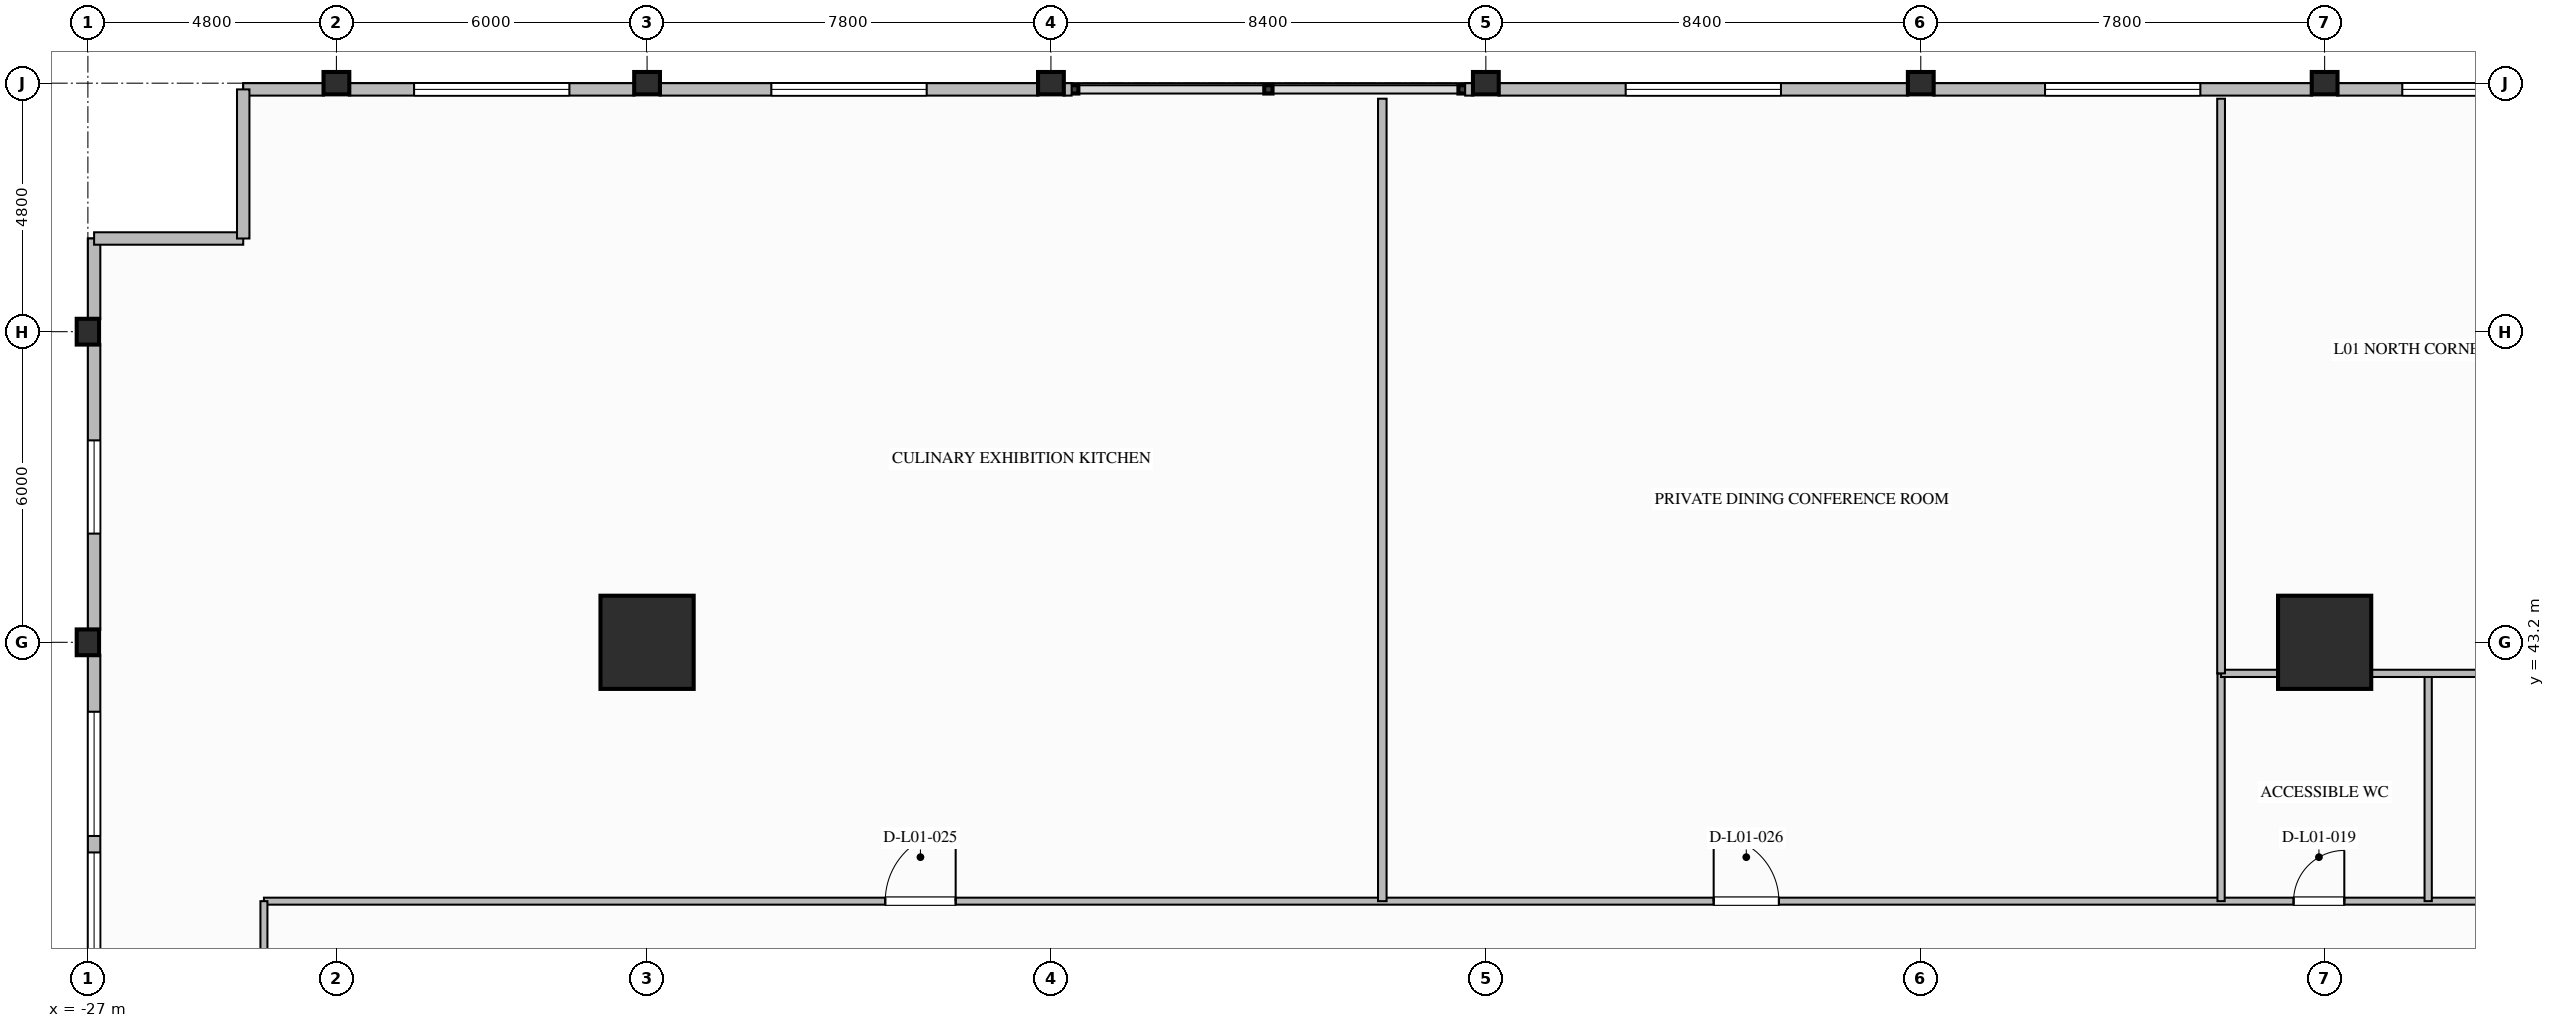
"""IFC4 building model, lengths in metres.
Left out: names, types, materials, properties, quantities, classifications, styles, units other than length and angle.
Written with IfcOpenShell. Run it as: python <this file> out.ifc"""

import sys

from ifc_helpers import new_model, si_unit, direction, frame, frame_2d, origin, origin_2d, place, context, subcontext, project, spatial, rectangle, i_section, extrude, element, fill, save


model = new_model("IFC4")
c1 = context("Model", 3, precision=1e-05, world=origin(), true_north=direction((0.0, 1.0)))
c2 = subcontext(c1, "Body", "Model", "MODEL_VIEW")
j1 = project(units=[si_unit("LENGTHUNIT", "METRE"), si_unit("PLANEANGLEUNIT", "RADIAN")], contexts=[c1])
p1 = place(None, origin())
s1 = spatial("IfcSite", under=j1, at=p1, CompositionType="ELEMENT")
p2 = place(p1, origin())
s2 = spatial("IfcBuilding", under=s1, at=p2, CompositionType="ELEMENT")
p3 = place(p2, frame((0.0, 0.0, 5.6)))
s3 = spatial("IfcBuildingStorey", under=s2, at=p3, CompositionType="ELEMENT", Elevation=5.6)
for number, where, z_axis, x_axis in (
    (1, (-16.2, 43.2, 0.0), (0.0, 0.0, 1.0), (1.0, 0.0, 0.0)),
    (2, (16.2, 43.2, 0.0), (0.0, 0.0, 1.0), (1.0, 0.0, 0.0)),
):
    element("IfcColumn", number, at=place(p3, frame(where, z_axis=z_axis, x_axis=x_axis)), inside=s3, PredefinedType="COLUMN", context=c2, shape_type="SweptSolid", body=[
        extrude(rectangle(XDim=1.8, YDim=1.8, at=origin_2d()), origin(), (0.0, 0.0, 1.0), 5.2),
    ])
for number, where, z_axis, x_axis in (
    (3, (-27.0, 43.2, 0.0), (0.0, 0.0, 1.0), (1.0, 0.0, 0.0)),
    (4, (-27.0, 49.2, 0.0), (0.0, 0.0, 1.0), (1.0, 0.0, 0.0)),
    (5, (-22.2, 54.0, 0.0), (0.0, 0.0, 1.0), (0.0, 1.0, 0.0)),
    (6, (-16.2, 54.0, 0.0), (0.0, 0.0, 1.0), (0.0, 1.0, 0.0)),
    (7, (-8.4, 54.0, 0.0), (0.0, 0.0, 1.0), (0.0, 1.0, 0.0)),
    (8, (0.0, 54.0, 0.0), (0.0, 0.0, 1.0), (0.0, 1.0, 0.0)),
    (9, (8.4, 54.0, 0.0), (0.0, 0.0, 1.0), (0.0, 1.0, 0.0)),
    (10, (16.2, 54.0, 0.0), (0.0, 0.0, 1.0), (0.0, 1.0, 0.0)),
):
    element("IfcColumn", number, at=place(p3, frame(where, z_axis=z_axis, x_axis=x_axis)), inside=s3, PredefinedType="COLUMN", context=c2, shape_type="SweptSolid", body=[
        extrude(i_section(OverallWidth=0.432, OverallDepth=0.498, WebThickness=0.056, FlangeThickness=0.089, FilletRadius=0.03, at=origin_2d()), origin(), (0.0, 0.0, 1.0), 5.2),
    ])
p4 = place(p3, frame((-26.88, 35.641, 0.0), z_axis=(0.0, 0.0, 1.0), x_axis=(0.0, 1.0, 0.0)))
e11 = element("IfcWall", 11, at=p4, inside=s3, PredefinedType="STANDARD", context=c2, shape_type="SweptSolid", body=[
    extrude(rectangle(XDim=7.318, YDim=0.24, at=frame_2d((3.659, 0.0))), origin(), (0.0, 0.0, 1.0), 4.154),
])
p5 = place(p4, frame((1.1, 0.0, 0.7)))
e12 = element("IfcOpeningElement", 12, at=p5, cuts=e11, PredefinedType="OPENING", context=c2, shape_type="SweptSolid", body=[
    extrude(rectangle(XDim=2.4, YDim=2.4, at=frame_2d((1.2, 1.2))), frame((0.0, 0.13, 0.0), z_axis=(0.0, -1.0, 0.0), x_axis=(1.0, 0.0, 0.0)), (0.0, 0.0, 1.0), 0.26),
])
p6 = place(p4, frame((3.818, 0.0, 0.7)))
e13 = element("IfcOpeningElement", 13, at=p6, cuts=e11, PredefinedType="OPENING", context=c2, shape_type="SweptSolid", body=[
    extrude(rectangle(XDim=2.4, YDim=2.4, at=frame_2d((1.2, 1.2))), frame((0.0, 0.13, 0.0), z_axis=(0.0, -1.0, 0.0), x_axis=(1.0, 0.0, 0.0)), (0.0, 0.0, 1.0), 0.26),
])
p7 = place(p3, frame((-26.88, 43.441, 0.0), z_axis=(0.0, 0.0, 1.0), x_axis=(0.0, 1.0, 0.0)))
e14 = element("IfcWall", 14, at=p7, inside=s3, PredefinedType="STANDARD", context=c2, shape_type="SweptSolid", body=[
    extrude(rectangle(XDim=5.518, YDim=0.24, at=frame_2d((2.759, 0.0))), origin(), (0.0, 0.0, 1.0), 4.154),
])
p8 = place(p7, frame((1.859, 0.0, 0.7)))
e15 = element("IfcOpeningElement", 15, at=p8, cuts=e14, PredefinedType="OPENING", context=c2, shape_type="SweptSolid", body=[
    extrude(rectangle(XDim=1.8, YDim=2.2, at=frame_2d((0.9, 1.1))), frame((0.0, 0.13, 0.0), z_axis=(0.0, -1.0, 0.0), x_axis=(1.0, 0.0, 0.0)), (0.0, 0.0, 1.0), 0.26),
])
for number, where, z_axis, x_axis in (
    (16, (-26.88, 49.441, 0.0), (0.0, 0.0, 1.0), (0.0, 1.0, 0.0)),
    (17, (-24.0, 53.88, 0.0), (0.0, 0.0, 1.0), (1.0, 0.0, 0.0)),
):
    element("IfcWall", number, at=place(p3, frame(where, z_axis=z_axis, x_axis=x_axis)), inside=s3, PredefinedType="STANDARD", context=c2, shape_type="SweptSolid", body=[
        extrude(rectangle(XDim=1.559, YDim=0.24, at=frame_2d((0.78, 0.0))), origin(), (0.0, 0.0, 1.0), 4.85),
    ])
p9 = place(p3, frame((-21.959, 53.88, 0.0), z_axis=(0.0, 0.0, 1.0), x_axis=(1.0, 0.0, 0.0)))
e18 = element("IfcWall", 18, at=p9, inside=s3, PredefinedType="STANDARD", context=c2, shape_type="SweptSolid", body=[
    extrude(rectangle(XDim=5.518, YDim=0.24, at=frame_2d((2.759, 0.0))), origin(), (0.0, 0.0, 1.0), 4.154),
])
p10 = place(p9, frame((1.259, 0.0, 0.65)))
e19 = element("IfcOpeningElement", 19, at=p10, cuts=e18, PredefinedType="OPENING", context=c2, shape_type="SweptSolid", body=[
    extrude(rectangle(XDim=3.0, YDim=2.2, at=frame_2d((1.5, 1.1))), frame((0.0, 0.13, 0.0), z_axis=(0.0, -1.0, 0.0), x_axis=(1.0, 0.0, 0.0)), (0.0, 0.0, 1.0), 0.26),
])
p11 = place(p3, frame((-15.959, 53.88, 0.0), z_axis=(0.0, 0.0, 1.0), x_axis=(1.0, 0.0, 0.0)))
e20 = element("IfcWall", 20, at=p11, inside=s3, PredefinedType="STANDARD", context=c2, shape_type="SweptSolid", body=[
    extrude(rectangle(XDim=7.318, YDim=0.24, at=frame_2d((3.659, 0.0))), origin(), (0.0, 0.0, 1.0), 4.154),
])
p12 = place(p11, frame((2.159, 0.0, 0.65)))
e21 = element("IfcOpeningElement", 21, at=p12, cuts=e20, PredefinedType="OPENING", context=c2, shape_type="SweptSolid", body=[
    extrude(rectangle(XDim=3.0, YDim=2.2, at=frame_2d((1.5, 1.1))), frame((0.0, 0.13, 0.0), z_axis=(0.0, -1.0, 0.0), x_axis=(1.0, 0.0, 0.0)), (0.0, 0.0, 1.0), 0.26),
])
p13 = place(p3, frame((-8.159, 53.88, 0.0), z_axis=(0.0, 0.0, 1.0), x_axis=(1.0, 0.0, 0.0)))
e22 = element("IfcWall", 22, at=p13, inside=s3, PredefinedType="STANDARD", context=c2, shape_type="SweptSolid", body=[
    extrude(rectangle(XDim=0.159, YDim=0.24, at=frame_2d((0.08, 0.0))), origin(), (0.0, 0.0, 1.0), 4.85),
])
p14 = place(p3, frame((-0.4, 53.88, 0.0), z_axis=(0.0, 0.0, 1.0), x_axis=(1.0, 0.0, 0.0)))
e23 = element("IfcWall", 23, at=p14, inside=s3, PredefinedType="STANDARD", context=c2, shape_type="SweptSolid", body=[
    extrude(rectangle(XDim=0.159, YDim=0.24, at=frame_2d((0.08, 0.0))), origin(), (0.0, 0.0, 1.0), 4.85),
])
p15 = place(p3, frame((0.241, 53.88, 0.0), z_axis=(0.0, 0.0, 1.0), x_axis=(1.0, 0.0, 0.0)))
e24 = element("IfcWall", 24, at=p15, inside=s3, PredefinedType="STANDARD", context=c2, shape_type="SweptSolid", body=[
    extrude(rectangle(XDim=7.918, YDim=0.24, at=frame_2d((3.959, 0.0))), origin(), (0.0, 0.0, 1.0), 4.154),
])
p16 = place(p15, frame((2.459, 0.0, 0.65)))
e25 = element("IfcOpeningElement", 25, at=p16, cuts=e24, PredefinedType="OPENING", context=c2, shape_type="SweptSolid", body=[
    extrude(rectangle(XDim=3.0, YDim=2.2, at=frame_2d((1.5, 1.1))), frame((0.0, 0.13, 0.0), z_axis=(0.0, -1.0, 0.0), x_axis=(1.0, 0.0, 0.0)), (0.0, 0.0, 1.0), 0.26),
])
p17 = place(p3, frame((8.641, 53.88, 0.0), z_axis=(0.0, 0.0, 1.0), x_axis=(1.0, 0.0, 0.0)))
e26 = element("IfcWall", 26, at=p17, inside=s3, PredefinedType="STANDARD", context=c2, shape_type="SweptSolid", body=[
    extrude(rectangle(XDim=7.318, YDim=0.24, at=frame_2d((3.659, 0.0))), origin(), (0.0, 0.0, 1.0), 4.154),
])
p18 = place(p17, frame((2.159, 0.0, 0.65)))
e27 = element("IfcOpeningElement", 27, at=p18, cuts=e26, PredefinedType="OPENING", context=c2, shape_type="SweptSolid", body=[
    extrude(rectangle(XDim=3.0, YDim=2.2, at=frame_2d((1.5, 1.1))), frame((0.0, 0.13, 0.0), z_axis=(0.0, -1.0, 0.0), x_axis=(1.0, 0.0, 0.0)), (0.0, 0.0, 1.0), 0.26),
])
p19 = place(p3, frame((16.441, 53.88, 0.0), z_axis=(0.0, 0.0, 1.0), x_axis=(1.0, 0.0, 0.0)))
e28 = element("IfcWall", 28, at=p19, inside=s3, PredefinedType="STANDARD", context=c2, shape_type="SweptSolid", body=[
    extrude(rectangle(XDim=5.518, YDim=0.24, at=frame_2d((2.759, 0.0))), origin(), (0.0, 0.0, 1.0), 4.154),
])
p20 = place(p19, frame((1.259, 0.0, 0.65)))
e29 = element("IfcOpeningElement", 29, at=p20, cuts=e28, PredefinedType="OPENING", context=c2, shape_type="SweptSolid", body=[
    extrude(rectangle(XDim=3.0, YDim=2.2, at=frame_2d((1.5, 1.1))), frame((0.0, 0.13, 0.0), z_axis=(0.0, -1.0, 0.0), x_axis=(1.0, 0.0, 0.0)), (0.0, 0.0, 1.0), 0.26),
])
for number, where, z_axis, x_axis in (
    (30, (-26.88, 51.0, 0.0), (0.0, 0.0, 1.0), (1.0, 0.0, 0.0)),
    (31, (-24.0, 51.0, 0.0), (0.0, 0.0, 1.0), (0.0, 1.0, 0.0)),
):
    element("IfcWall", number, at=place(p3, frame(where, z_axis=z_axis, x_axis=x_axis)), inside=s3, PredefinedType="STANDARD", context=c2, shape_type="SweptSolid", body=[
        extrude(rectangle(XDim=2.88, YDim=0.24, at=frame_2d((1.44, 0.0))), origin(), (0.0, 0.0, 1.0), 4.85),
    ])
p21 = place(p3, frame((-23.6, 38.2, 0.0), z_axis=(0.0, 0.0, 1.0), x_axis=(1.0, 0.0, 0.0)))
e32 = element("IfcWall", 32, at=p21, inside=s3, PredefinedType="PARTITIONING", context=c2, shape_type="SweptSolid", body=[
    extrude(rectangle(XDim=47.3, YDim=0.135, at=frame_2d((23.65, 0.0))), origin(), (0.0, 0.0, 1.0), 4.85),
])
p22 = place(p21, frame((39.2, 0.0, 0.0)))
e33 = element("IfcOpeningElement", 33, at=p22, cuts=e32, PredefinedType="OPENING", context=c2, shape_type="SweptSolid", body=[
    extrude(rectangle(XDim=0.98, YDim=2.1, at=frame_2d((0.49, 1.05))), frame((0.0, 0.077, 0.0), z_axis=(0.0, -1.0, 0.0), x_axis=(1.0, 0.0, 0.0)), (0.0, 0.0, 1.0), 0.155),
])
p23 = place(p21, frame((44.0, 0.0, 0.0)))
e34 = element("IfcOpeningElement", 34, at=p23, cuts=e32, PredefinedType="OPENING", context=c2, shape_type="SweptSolid", body=[
    extrude(rectangle(XDim=0.92, YDim=2.1, at=frame_2d((0.46, 1.05))), frame((0.0, 0.077, 0.0), z_axis=(0.0, -1.0, 0.0), x_axis=(1.0, 0.0, 0.0)), (0.0, 0.0, 1.0), 0.155),
])
p24 = place(p21, frame((12.0, 0.0, 0.0)))
e35 = element("IfcOpeningElement", 35, at=p24, cuts=e32, PredefinedType="OPENING", context=c2, shape_type="SweptSolid", body=[
    extrude(rectangle(XDim=1.36, YDim=2.2, at=frame_2d((0.68, 1.1))), frame((0.0, 0.077, 0.0), z_axis=(0.0, -1.0, 0.0), x_axis=(1.0, 0.0, 0.0)), (0.0, 0.0, 1.0), 0.155),
])
p25 = place(p21, frame((28.0, 0.0, 0.0)))
e36 = element("IfcOpeningElement", 36, at=p25, cuts=e32, PredefinedType="OPENING", context=c2, shape_type="SweptSolid", body=[
    extrude(rectangle(XDim=1.26, YDim=2.2, at=frame_2d((0.63, 1.1))), frame((0.0, 0.077, 0.0), z_axis=(0.0, -1.0, 0.0), x_axis=(1.0, 0.0, 0.0)), (0.0, 0.0, 1.0), 0.155),
])
p26 = place(p3, frame((-23.6, 0.3, 0.0), z_axis=(0.0, 0.0, 1.0), x_axis=(0.0, 1.0, 0.0)))
e37 = element("IfcWall", 37, at=p26, inside=s3, PredefinedType="PARTITIONING", context=c2, shape_type="SweptSolid", body=[
    extrude(rectangle(XDim=37.9, YDim=0.135, at=frame_2d((18.95, 0.0))), origin(), (0.0, 0.0, 1.0), 4.85),
])
p27 = place(p26, frame((9.0, 0.0, 0.0)))
e38 = element("IfcOpeningElement", 38, at=p27, cuts=e37, PredefinedType="OPENING", context=c2, shape_type="SweptSolid", body=[
    extrude(rectangle(XDim=1.08, YDim=2.04, at=frame_2d((0.54, 1.02))), frame((0.0, 0.077, 0.0), z_axis=(0.0, -1.0, 0.0), x_axis=(1.0, 0.0, 0.0)), (0.0, 0.0, 1.0), 0.155),
])
for number, where, z_axis, x_axis in (
    (39, (14.2, 38.2, 0.0), (0.0, 0.0, 1.0), (0.0, 1.0, 0.0)),
    (40, (18.2, 38.2, 0.0), (0.0, 0.0, 1.0), (0.0, 1.0, 0.0)),
):
    element("IfcWall", number, at=place(p3, frame(where, z_axis=z_axis, x_axis=x_axis)), inside=s3, PredefinedType="PLUMBINGWALL", context=c2, shape_type="SweptSolid", body=[
        extrude(rectangle(XDim=4.4, YDim=0.14, at=frame_2d((2.2, 0.0))), origin(), (0.0, 0.0, 1.0), 4.85),
    ])
p28 = place(p3, frame((14.2, 42.6, 0.0), z_axis=(0.0, 0.0, 1.0), x_axis=(1.0, 0.0, 0.0)))
e41 = element("IfcWall", 41, at=p28, inside=s3, PredefinedType="PLUMBINGWALL", context=c2, shape_type="SweptSolid", body=[
    extrude(rectangle(XDim=9.5, YDim=0.14, at=frame_2d((4.75, 0.0))), origin(), (0.0, 0.0, 1.0), 4.85),
])
p29 = place(p3, frame((14.2, 42.6, 0.0), z_axis=(0.0, 0.0, 1.0), x_axis=(0.0, 1.0, 0.0)))
e42 = element("IfcWall", 42, at=p29, inside=s3, PredefinedType="PARTITIONING", context=c2, shape_type="SweptSolid", body=[
    extrude(rectangle(XDim=11.1, YDim=0.15, at=frame_2d((5.55, 0.0))), origin(), (0.0, 0.0, 1.0), 4.85),
])
p30 = place(p3, frame((-2.0, 38.2, 0.0), z_axis=(0.0, 0.0, 1.0), x_axis=(0.0, 1.0, 0.0)))
e43 = element("IfcWall", 43, at=p30, inside=s3, PredefinedType="PARTITIONING", context=c2, shape_type="SweptSolid", body=[
    extrude(rectangle(XDim=15.5, YDim=0.165, at=frame_2d((7.75, 0.0))), origin(), (0.0, 0.0, 1.0), 4.85),
])
p31 = place(p5, origin())
e44 = element("IfcWindow", 44, at=p31, inside=s3, PartitioningType="SINGLE_PANEL", PredefinedType="WINDOW", context=c2, shape_type="SweptSolid", body=[
    extrude(rectangle(XDim=2.4, YDim=2.4, at=frame_2d((1.2, 1.2))), frame((0.0, 0.03, 0.0), z_axis=(0.0, -1.0, 0.0), x_axis=(1.0, 0.0, 0.0)), (0.0, 0.0, 1.0), 0.06),
])
fill(e12, e44)
p32 = place(p6, origin())
e45 = element("IfcWindow", 45, at=p32, inside=s3, PartitioningType="SINGLE_PANEL", PredefinedType="WINDOW", context=c2, shape_type="SweptSolid", body=[
    extrude(rectangle(XDim=2.4, YDim=2.4, at=frame_2d((1.2, 1.2))), frame((0.0, 0.03, 0.0), z_axis=(0.0, -1.0, 0.0), x_axis=(1.0, 0.0, 0.0)), (0.0, 0.0, 1.0), 0.06),
])
fill(e13, e45)
p33 = place(p8, origin())
e46 = element("IfcWindow", 46, at=p33, inside=s3, PartitioningType="SINGLE_PANEL", PredefinedType="WINDOW", context=c2, shape_type="SweptSolid", body=[
    extrude(rectangle(XDim=1.8, YDim=2.2, at=frame_2d((0.9, 1.1))), frame((0.0, 0.03, 0.0), z_axis=(0.0, -1.0, 0.0), x_axis=(1.0, 0.0, 0.0)), (0.0, 0.0, 1.0), 0.06),
])
fill(e15, e46)
p34 = place(p10, origin())
e47 = element("IfcWindow", 47, at=p34, inside=s3, PartitioningType="SINGLE_PANEL", PredefinedType="WINDOW", context=c2, shape_type="SweptSolid", body=[
    extrude(rectangle(XDim=3.0, YDim=2.2, at=frame_2d((1.5, 1.1))), frame((0.0, 0.03, 0.0), z_axis=(0.0, -1.0, 0.0), x_axis=(1.0, 0.0, 0.0)), (0.0, 0.0, 1.0), 0.06),
])
fill(e19, e47)
p35 = place(p12, origin())
e48 = element("IfcWindow", 48, at=p35, inside=s3, PartitioningType="SINGLE_PANEL", PredefinedType="WINDOW", context=c2, shape_type="SweptSolid", body=[
    extrude(rectangle(XDim=3.0, YDim=2.2, at=frame_2d((1.5, 1.1))), frame((0.0, 0.03, 0.0), z_axis=(0.0, -1.0, 0.0), x_axis=(1.0, 0.0, 0.0)), (0.0, 0.0, 1.0), 0.06),
])
fill(e21, e48)
p36 = place(p16, origin())
e49 = element("IfcWindow", 49, at=p36, inside=s3, PartitioningType="SINGLE_PANEL", PredefinedType="WINDOW", context=c2, shape_type="SweptSolid", body=[
    extrude(rectangle(XDim=3.0, YDim=2.2, at=frame_2d((1.5, 1.1))), frame((0.0, 0.03, 0.0), z_axis=(0.0, -1.0, 0.0), x_axis=(1.0, 0.0, 0.0)), (0.0, 0.0, 1.0), 0.06),
])
fill(e25, e49)
p37 = place(p18, origin())
e50 = element("IfcWindow", 50, at=p37, inside=s3, PartitioningType="SINGLE_PANEL", PredefinedType="WINDOW", context=c2, shape_type="SweptSolid", body=[
    extrude(rectangle(XDim=3.0, YDim=2.2, at=frame_2d((1.5, 1.1))), frame((0.0, 0.03, 0.0), z_axis=(0.0, -1.0, 0.0), x_axis=(1.0, 0.0, 0.0)), (0.0, 0.0, 1.0), 0.06),
])
fill(e27, e50)
p38 = place(p20, origin())
e51 = element("IfcWindow", 51, at=p38, inside=s3, PartitioningType="SINGLE_PANEL", PredefinedType="WINDOW", context=c2, shape_type="SweptSolid", body=[
    extrude(rectangle(XDim=3.0, YDim=2.2, at=frame_2d((1.5, 1.1))), frame((0.0, 0.03, 0.0), z_axis=(0.0, -1.0, 0.0), x_axis=(1.0, 0.0, 0.0)), (0.0, 0.0, 1.0), 0.06),
])
fill(e29, e51)
p39 = place(p22, origin())
e52 = element("IfcDoor", 52, at=p39, inside=s3, OperationType="SINGLE_SWING_RIGHT", PredefinedType="DOOR", context=c2, shape_type="SweptSolid", body=[
    extrude(rectangle(XDim=0.98, YDim=2.1, at=frame_2d((0.49, 1.05))), frame((0.0, 0.025, 0.0), z_axis=(0.0, -1.0, 0.0), x_axis=(1.0, 0.0, 0.0)), (0.0, 0.0, 1.0), 0.05),
])
fill(e33, e52)
p40 = place(p24, origin())
e53 = element("IfcDoor", 53, at=p40, inside=s3, OperationType="SINGLE_SWING_RIGHT", PredefinedType="DOOR", context=c2, shape_type="SweptSolid", body=[
    extrude(rectangle(XDim=1.36, YDim=2.2, at=frame_2d((0.68, 1.1))), frame((0.0, 0.025, 0.0), z_axis=(0.0, -1.0, 0.0), x_axis=(1.0, 0.0, 0.0)), (0.0, 0.0, 1.0), 0.05),
])
fill(e35, e53)
p41 = place(p25, origin())
e54 = element("IfcDoor", 54, at=p41, inside=s3, OperationType="SINGLE_SWING_LEFT", PredefinedType="DOOR", context=c2, shape_type="SweptSolid", body=[
    extrude(rectangle(XDim=1.26, YDim=2.2, at=frame_2d((0.63, 1.1))), frame((0.0, 0.025, 0.0), z_axis=(0.0, -1.0, 0.0), x_axis=(1.0, 0.0, 0.0)), (0.0, 0.0, 1.0), 0.05),
])
fill(e36, e54)
save(model, sys.argv[1])
